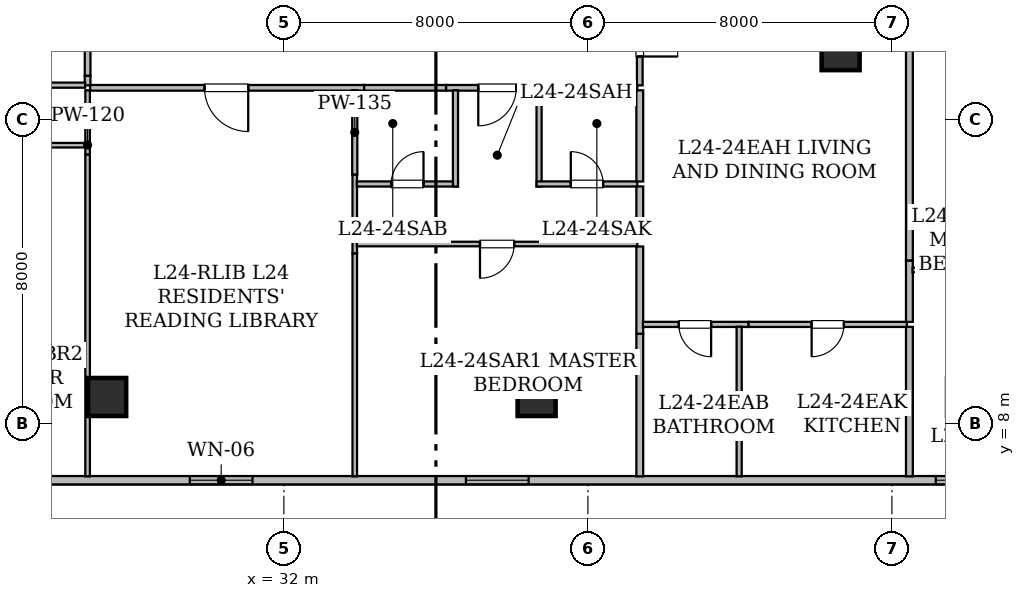
"""IFC4 building model, lengths in metres.
Left out: names, types, materials, properties, quantities, classifications, styles, units other than length and angle.
Written with IfcOpenShell. Run it as: python <this file> out.ifc"""

import sys

from ifc_helpers import new_model, si_unit, direction, frame, frame_2d, origin, origin_2d, place, context, subcontext, project, spatial, rectangle, hollow_rectangle, extrude, element, fill, save


model = new_model("IFC4")
c1 = context("Model", 3, precision=1e-05, world=origin(), true_north=direction((0.0, 1.0)))
c2 = subcontext(c1, "Body", "Model", "MODEL_VIEW")
j1 = project(units=[si_unit("LENGTHUNIT", "METRE"), si_unit("PLANEANGLEUNIT", "RADIAN")], contexts=[c1])
p1 = place(None, origin())
s1 = spatial("IfcSite", under=j1, at=p1, CompositionType="ELEMENT")
p2 = place(p1, origin())
s2 = spatial("IfcBuilding", under=s1, at=p2, CompositionType="ELEMENT")
p3 = place(p2, frame((0.0, 0.0, 98.25)))
s3 = spatial("IfcBuildingStorey", under=s2, at=p3, CompositionType="ELEMENT", Elevation=98.25)
for number, where, z_axis, x_axis in (
    (1, (27.35, 8.7, 0.0), (0.0, 0.0, 1.0), (1.0, 0.0, 0.0)),
    (2, (38.65, 8.7, 0.0), (0.0, 0.0, 1.0), (1.0, 0.0, 0.0)),
    (3, (46.65, 17.8, 0.0), (0.0, 0.0, 1.0), (1.0, 0.0, 0.0)),
):
    element("IfcColumn", number, at=place(p3, frame(where, z_axis=z_axis, x_axis=x_axis)), inside=s3, PredefinedType="COLUMN", context=c2, shape_type="SweptSolid", body=[
        extrude(hollow_rectangle(XDim=1.0, YDim=1.0, WallThickness=0.05, at=origin_2d()), origin(), (0.0, 0.0, 1.0), 3.65),
    ])
p4 = place(p3, frame((52.283, 6.51, 0.0), z_axis=(0.0, 0.0, 1.0), x_axis=(-1.0, 0.0, 0.0)))
e4 = element("IfcWall", 4, at=p4, inside=s3, PredefinedType="STANDARD", context=c2, shape_type="SweptSolid", body=[
    extrude(rectangle(XDim=38.568, YDim=0.22, at=frame_2d((19.284, 0.0))), origin(), (0.0, 0.0, 1.0), 3.43),
])
p5 = place(p4, frame((21.108, 0.0, 0.85)))
e5 = element("IfcOpeningElement", 5, at=p5, cuts=e4, PredefinedType="OPENING", context=c2, shape_type="SweptSolid", body=[
    extrude(rectangle(XDim=1.65, YDim=1.55, at=frame_2d((0.825, 0.775))), frame((0.0, 0.12, 0.0), z_axis=(0.0, -1.0, 0.0), x_axis=(1.0, 0.0, 0.0)), (0.0, 0.0, 1.0), 0.24),
])
p6 = place(p4, frame((35.355, 0.0, 0.85)))
e6 = element("IfcOpeningElement", 6, at=p6, cuts=e4, PredefinedType="OPENING", context=c2, shape_type="SweptSolid", body=[
    extrude(rectangle(XDim=1.65, YDim=1.55, at=frame_2d((0.825, 0.775))), frame((0.0, 0.12, 0.0), z_axis=(0.0, -1.0, 0.0), x_axis=(1.0, 0.0, 0.0)), (0.0, 0.0, 1.0), 0.24),
])
p7 = place(p4, frame((29.413, 0.0, 0.8)))
e7 = element("IfcOpeningElement", 7, at=p7, cuts=e4, PredefinedType="OPENING", context=c2, shape_type="SweptSolid", body=[
    extrude(rectangle(XDim=1.2, YDim=1.5, at=frame_2d((0.6, 0.75))), frame((0.0, 0.12, 0.0), z_axis=(0.0, -1.0, 0.0), x_axis=(1.0, 0.0, 0.0)), (0.0, 0.0, 1.0), 0.24),
])
p8 = place(p4, frame((31.863, 0.0, 0.85)))
e8 = element("IfcOpeningElement", 8, at=p8, cuts=e4, PredefinedType="OPENING", context=c2, shape_type="SweptSolid", body=[
    extrude(rectangle(XDim=1.65, YDim=1.55, at=frame_2d((0.825, 0.775))), frame((0.0, 0.12, 0.0), z_axis=(0.0, -1.0, 0.0), x_axis=(1.0, 0.0, 0.0)), (0.0, 0.0, 1.0), 0.24),
])
p9 = place(p4, frame((26.513, 0.0, 0.85)))
e9 = element("IfcOpeningElement", 9, at=p9, cuts=e4, PredefinedType="OPENING", context=c2, shape_type="SweptSolid", body=[
    extrude(rectangle(XDim=1.65, YDim=1.55, at=frame_2d((0.825, 0.775))), frame((0.0, 0.12, 0.0), z_axis=(0.0, -1.0, 0.0), x_axis=(1.0, 0.0, 0.0)), (0.0, 0.0, 1.0), 0.24),
])
p10 = place(p4, frame((13.843, 0.0, 0.85)))
e10 = element("IfcOpeningElement", 10, at=p10, cuts=e4, PredefinedType="OPENING", context=c2, shape_type="SweptSolid", body=[
    extrude(rectangle(XDim=1.65, YDim=1.55, at=frame_2d((0.825, 0.775))), frame((0.0, 0.12, 0.0), z_axis=(0.0, -1.0, 0.0), x_axis=(1.0, 0.0, 0.0)), (0.0, 0.0, 1.0), 0.24),
])
p11 = place(p4, frame((1.479, 0.0, 0.85)))
e11 = element("IfcOpeningElement", 11, at=p11, cuts=e4, PredefinedType="OPENING", context=c2, shape_type="SweptSolid", body=[
    extrude(rectangle(XDim=1.65, YDim=1.55, at=frame_2d((0.825, 0.775))), frame((0.0, 0.12, 0.0), z_axis=(0.0, -1.0, 0.0), x_axis=(1.0, 0.0, 0.0)), (0.0, 0.0, 1.0), 0.24),
])
p12 = place(p3, frame((34.114, 16.835, 0.0), z_axis=(0.0, 0.0, 1.0), x_axis=(-1.0, 0.0, 0.0)))
e12 = element("IfcWall", 12, at=p12, inside=s3, PredefinedType="STANDARD", context=c2, shape_type="SweptSolid", body=[
    extrude(rectangle(XDim=7.214, YDim=0.15, at=frame_2d((3.607, 0.0))), origin(), (0.0, 0.0, 1.0), 2.647),
])
p13 = place(p12, frame((3.053, 0.0, 0.0)))
e13 = element("IfcOpeningElement", 13, at=p13, cuts=e12, PredefinedType="OPENING", context=c2, shape_type="SweptSolid", body=[
    extrude(rectangle(XDim=1.15, YDim=2.2, at=frame_2d((0.575, 1.1))), frame((0.0, 0.085, 0.0), z_axis=(0.0, -1.0, 0.0), x_axis=(1.0, 0.0, 0.0)), (0.0, 0.0, 1.0), 0.17),
])
p14 = place(p3, frame((26.835, 16.9, 0.0), z_axis=(0.0, 0.0, 1.0), x_axis=(0.0, 1.0, 0.0)))
e14 = element("IfcWall", 14, at=p14, inside=s3, PredefinedType="STANDARD", context=c2, shape_type="SweptSolid", body=[
    extrude(rectangle(XDim=0.254, YDim=0.15, at=frame_2d((0.127, 0.0))), origin(), (0.0, 0.0, 1.0), 3.43),
])
p15 = place(p3, frame((26.835, 17.154, 0.0), z_axis=(0.0, 0.0, 1.0), x_axis=(0.0, 1.0, 0.0)))
e15 = element("IfcWall", 15, at=p15, inside=s3, PredefinedType="STANDARD", context=c2, shape_type="SweptSolid", body=[
    extrude(rectangle(XDim=3.396, YDim=0.15, at=frame_2d((1.698, 0.0))), origin(), (0.0, 0.0, 1.0), 2.647),
])
p16 = place(p3, frame((38.964, 16.835, 0.0), z_axis=(0.0, 0.0, 1.0), x_axis=(-1.0, 0.0, 0.0)))
e16 = element("IfcWall", 16, at=p16, inside=s3, PredefinedType="STANDARD", context=c2, shape_type="SweptSolid", body=[
    extrude(rectangle(XDim=2.698, YDim=0.15, at=frame_2d((1.349, 0.0))), origin(), (0.0, 0.0, 1.0), 3.43),
])
p17 = place(p16, frame((0.849, 0.0, 0.0)))
e17 = element("IfcOpeningElement", 17, at=p17, cuts=e16, PredefinedType="OPENING", context=c2, shape_type="SweptSolid", body=[
    extrude(rectangle(XDim=1.0, YDim=2.15, at=frame_2d((0.5, 1.075))), frame((0.0, 0.085, 0.0), z_axis=(0.0, -1.0, 0.0), x_axis=(1.0, 0.0, 0.0)), (0.0, 0.0, 1.0), 0.17),
])
p18 = place(p3, frame((36.266, 16.835, 0.0), z_axis=(0.0, 0.0, 1.0), x_axis=(-1.0, 0.0, 0.0)))
e18 = element("IfcWall", 18, at=p18, inside=s3, PredefinedType="STANDARD", context=c2, shape_type="SweptSolid", body=[
    extrude(rectangle(XDim=2.152, YDim=0.15, at=frame_2d((1.076, 0.0))), origin(), (0.0, 0.0, 1.0), 3.43),
])
p19 = place(p3, frame((41.3, 16.835, 0.0), z_axis=(0.0, 0.0, 1.0), x_axis=(-1.0, 0.0, 0.0)))
e19 = element("IfcWall", 19, at=p19, inside=s3, PredefinedType="STANDARD", context=c2, shape_type="SweptSolid", body=[
    extrude(rectangle(XDim=2.336, YDim=0.15, at=frame_2d((1.168, 0.0))), origin(), (0.0, 0.0, 1.0), 2.647),
])
p20 = place(p3, frame((41.365, 19.459, 0.0), z_axis=(0.0, 0.0, 1.0), x_axis=(0.0, -1.0, 0.0)))
e20 = element("IfcWall", 20, at=p20, inside=s3, PredefinedType="STANDARD", context=c2, shape_type="SweptSolid", body=[
    extrude(rectangle(XDim=2.559, YDim=0.15, at=frame_2d((1.28, 0.0))), origin(), (0.0, 0.0, 1.0), 2.647),
])
p21 = place(p20, frame((0.8, 0.0, 0.0)))
e21 = element("IfcOpeningElement", 21, at=p21, cuts=e20, PredefinedType="OPENING", context=c2, shape_type="SweptSolid", body=[
    extrude(rectangle(XDim=1.0, YDim=2.15, at=frame_2d((0.5, 1.075))), frame((0.0, 0.085, 0.0), z_axis=(0.0, -1.0, 0.0), x_axis=(1.0, 0.0, 0.0)), (0.0, 0.0, 1.0), 0.17),
])
p22 = place(p3, frame((26.835, 15.076, 0.0), z_axis=(0.0, 0.0, 1.0), x_axis=(0.0, 1.0, 0.0)))
e22 = element("IfcWall", 22, at=p22, inside=s3, PredefinedType="PARTITIONING", context=c2, shape_type="SweptSolid", body=[
    extrude(rectangle(XDim=1.694, YDim=0.12, at=frame_2d((0.847, 0.0))), origin(), (0.0, 0.0, 1.0), 3.43),
])
p23 = place(p3, frame((26.835, 6.612, 0.0), z_axis=(0.0, 0.0, 1.0), x_axis=(0.0, 1.0, 0.0)))
e23 = element("IfcWall", 23, at=p23, inside=s3, PredefinedType="PARTITIONING", context=c2, shape_type="SweptSolid", body=[
    extrude(rectangle(XDim=8.464, YDim=0.12, at=frame_2d((4.232, 0.0))), origin(), (0.0, 0.0, 1.0), 2.876),
])
p24 = place(p3, frame((33.865, 14.554, 0.0), z_axis=(0.0, 0.0, 1.0), x_axis=(0.0, -1.0, 0.0)))
e24 = element("IfcWall", 24, at=p24, inside=s3, PredefinedType="PARTITIONING", context=c2, shape_type="SweptSolid", body=[
    extrude(rectangle(XDim=2.078, YDim=0.12, at=frame_2d((1.039, 0.0))), origin(), (0.0, 0.0, 1.0), 3.43),
])
p25 = place(p3, frame((33.865, 16.77, 0.0), z_axis=(0.0, 0.0, 1.0), x_axis=(0.0, -1.0, 0.0)))
e25 = element("IfcWall", 25, at=p25, inside=s3, PredefinedType="PARTITIONING", context=c2, shape_type="SweptSolid", body=[
    extrude(rectangle(XDim=2.216, YDim=0.135, at=frame_2d((1.108, 0.0))), origin(), (0.0, 0.0, 1.0), 3.43),
])
p26 = place(p3, frame((33.865, 12.476, 0.0), z_axis=(0.0, 0.0, 1.0), x_axis=(0.0, -1.0, 0.0)))
e26 = element("IfcWall", 26, at=p26, inside=s3, PredefinedType="PARTITIONING", context=c2, shape_type="SweptSolid", body=[
    extrude(rectangle(XDim=5.864, YDim=0.12, at=frame_2d((2.932, 0.0))), origin(), (0.0, 0.0, 1.0), 2.876),
])
p27 = place(p3, frame((23.305, 16.905, 0.0), z_axis=(0.0, 0.0, 1.0), x_axis=(1.0, 0.0, 0.0)))
e27 = element("IfcWall", 27, at=p27, inside=s3, PredefinedType="PARTITIONING", context=c2, shape_type="SweptSolid", body=[
    extrude(rectangle(XDim=3.465, YDim=0.135, at=frame_2d((1.732, 0.0))), origin(), (0.0, 0.0, 1.0), 3.43),
])
p28 = place(p3, frame((26.781, 15.325, 0.0), z_axis=(0.0, 0.0, 1.0), x_axis=(-1.0, 0.0, 0.0)))
e28 = element("IfcWall", 28, at=p28, inside=s3, PredefinedType="PARTITIONING", context=c2, shape_type="SweptSolid", body=[
    extrude(rectangle(XDim=3.791, YDim=0.12, at=frame_2d((1.896, 0.0))), origin(), (0.0, 0.0, 1.0), 3.43),
])
p29 = place(p3, frame((33.919, 14.305, 0.0), z_axis=(0.0, 0.0, 1.0), x_axis=(1.0, 0.0, 0.0)))
e29 = element("IfcWall", 29, at=p29, inside=s3, PredefinedType="PARTITIONING", context=c2, shape_type="SweptSolid", body=[
    extrude(rectangle(XDim=2.661, YDim=0.135, at=frame_2d((1.331, 0.0))), origin(), (0.0, 0.0, 1.0), 3.43),
])
p30 = place(p29, frame((0.905, 0.0, 0.0)))
e30 = element("IfcOpeningElement", 30, at=p30, cuts=e29, PredefinedType="OPENING", context=c2, shape_type="SweptSolid", body=[
    extrude(rectangle(XDim=0.85, YDim=2.1, at=frame_2d((0.425, 1.05))), frame((0.0, 0.077, 0.0), z_axis=(0.0, -1.0, 0.0), x_axis=(1.0, 0.0, 0.0)), (0.0, 0.0, 1.0), 0.155),
])
p31 = place(p3, frame((36.515, 14.24, 0.0), z_axis=(0.0, 0.0, 1.0), x_axis=(0.0, 1.0, 0.0)))
e31 = element("IfcWall", 31, at=p31, inside=s3, PredefinedType="PARTITIONING", context=c2, shape_type="SweptSolid", body=[
    extrude(rectangle(XDim=2.53, YDim=0.135, at=frame_2d((1.265, 0.0))), origin(), (0.0, 0.0, 1.0), 3.43),
])
p32 = place(p3, frame((38.715, 16.77, 0.0), z_axis=(0.0, 0.0, 1.0), x_axis=(0.0, -1.0, 0.0)))
e32 = element("IfcWall", 32, at=p32, inside=s3, PredefinedType="PARTITIONING", context=c2, shape_type="SweptSolid", body=[
    extrude(rectangle(XDim=2.53, YDim=0.135, at=frame_2d((1.265, 0.0))), origin(), (0.0, 0.0, 1.0), 2.647),
])
p33 = place(p3, frame((38.65, 14.305, 0.0), z_axis=(0.0, 0.0, 1.0), x_axis=(1.0, 0.0, 0.0)))
e33 = element("IfcWall", 33, at=p33, inside=s3, PredefinedType="PARTITIONING", context=c2, shape_type="SweptSolid", body=[
    extrude(rectangle(XDim=2.65, YDim=0.135, at=frame_2d((1.325, 0.0))), origin(), (0.0, 0.0, 1.0), 2.647),
])
p34 = place(p33, frame((0.9, 0.0, 0.0)))
e34 = element("IfcOpeningElement", 34, at=p34, cuts=e33, PredefinedType="OPENING", context=c2, shape_type="SweptSolid", body=[
    extrude(rectangle(XDim=0.85, YDim=2.1, at=frame_2d((0.425, 1.05))), frame((0.0, 0.077, 0.0), z_axis=(0.0, -1.0, 0.0), x_axis=(1.0, 0.0, 0.0)), (0.0, 0.0, 1.0), 0.155),
])
p35 = place(p3, frame((41.3, 12.725, 0.0), z_axis=(0.0, 0.0, 1.0), x_axis=(-1.0, 0.0, 0.0)))
e35 = element("IfcWall", 35, at=p35, inside=s3, PredefinedType="PARTITIONING", context=c2, shape_type="SweptSolid", body=[
    extrude(rectangle(XDim=7.381, YDim=0.12, at=frame_2d((3.69, 0.0))), origin(), (0.0, 0.0, 1.0), 2.647),
])
p36 = place(p35, frame((3.24, 0.0, 0.0)))
e36 = element("IfcOpeningElement", 36, at=p36, cuts=e35, PredefinedType="OPENING", context=c2, shape_type="SweptSolid", body=[
    extrude(rectangle(XDim=0.9, YDim=2.1, at=frame_2d((0.45, 1.05))), frame((0.0, 0.07, 0.0), z_axis=(0.0, -1.0, 0.0), x_axis=(1.0, 0.0, 0.0)), (0.0, 0.0, 1.0), 0.14),
])
p37 = place(p3, frame((41.365, 14.24, 0.0), z_axis=(0.0, 0.0, 1.0), x_axis=(0.0, -1.0, 0.0)))
e37 = element("IfcWall", 37, at=p37, inside=s3, PredefinedType="STANDARD", context=c2, shape_type="SweptSolid", body=[
    extrude(rectangle(XDim=1.45, YDim=0.18, at=frame_2d((0.725, 0.0))), origin(), (0.0, 0.0, 1.0), 3.43),
])
p38 = place(p3, frame((41.365, 16.77, 0.0), z_axis=(0.0, 0.0, 1.0), x_axis=(0.0, -1.0, 0.0)))
e38 = element("IfcWall", 38, at=p38, inside=s3, PredefinedType="STANDARD", context=c2, shape_type="SweptSolid", body=[
    extrude(rectangle(XDim=2.4, YDim=0.18, at=frame_2d((1.2, 0.0))), origin(), (0.0, 0.0, 1.0), 3.43),
])
p39 = place(p3, frame((41.365, 12.66, 0.0), z_axis=(0.0, 0.0, 1.0), x_axis=(0.0, -1.0, 0.0)))
e39 = element("IfcWall", 39, at=p39, inside=s3, PredefinedType="STANDARD", context=c2, shape_type="SweptSolid", body=[
    extrude(rectangle(XDim=2.299, YDim=0.18, at=frame_2d((1.149, 0.0))), origin(), (0.0, 0.0, 1.0), 3.43),
])
p40 = place(p3, frame((41.365, 10.361, 0.0), z_axis=(0.0, 0.0, 1.0), x_axis=(0.0, -1.0, 0.0)))
e40 = element("IfcWall", 40, at=p40, inside=s3, PredefinedType="STANDARD", context=c2, shape_type="SweptSolid", body=[
    extrude(rectangle(XDim=3.749, YDim=0.18, at=frame_2d((1.875, 0.0))), origin(), (0.0, 0.0, 1.0), 2.876),
])
p41 = place(p3, frame((44.229, 10.61, 0.0), z_axis=(0.0, 0.0, 1.0), x_axis=(-1.0, 0.0, 0.0)))
e41 = element("IfcWall", 41, at=p41, inside=s3, PredefinedType="PARTITIONING", context=c2, shape_type="SweptSolid", body=[
    extrude(rectangle(XDim=2.782, YDim=0.135, at=frame_2d((1.391, 0.0))), origin(), (0.0, 0.0, 1.0), 3.43),
])
p42 = place(p41, frame((0.987, 0.0, 0.0)))
e42 = element("IfcOpeningElement", 42, at=p42, cuts=e41, PredefinedType="OPENING", context=c2, shape_type="SweptSolid", body=[
    extrude(rectangle(XDim=0.85, YDim=2.1, at=frame_2d((0.425, 1.05))), frame((0.0, 0.077, 0.0), z_axis=(0.0, -1.0, 0.0), x_axis=(1.0, 0.0, 0.0)), (0.0, 0.0, 1.0), 0.155),
])
p43 = place(p3, frame((48.395, 10.61, 0.0), z_axis=(0.0, 0.0, 1.0), x_axis=(-1.0, 0.0, 0.0)))
e43 = element("IfcWall", 43, at=p43, inside=s3, PredefinedType="PARTITIONING", context=c2, shape_type="SweptSolid", body=[
    extrude(rectangle(XDim=4.166, YDim=0.135, at=frame_2d((2.083, 0.0))), origin(), (0.0, 0.0, 1.0), 3.43),
])
p44 = place(p43, frame((1.658, 0.0, 0.0)))
e44 = element("IfcOpeningElement", 44, at=p44, cuts=e43, PredefinedType="OPENING", context=c2, shape_type="SweptSolid", body=[
    extrude(rectangle(XDim=0.85, YDim=2.1, at=frame_2d((0.425, 1.05))), frame((0.0, 0.077, 0.0), z_axis=(0.0, -1.0, 0.0), x_axis=(1.0, 0.0, 0.0)), (0.0, 0.0, 1.0), 0.155),
])
p45 = place(p3, frame((48.46, 12.292, 0.0), z_axis=(0.0, 0.0, 1.0), x_axis=(0.0, -1.0, 0.0)))
e45 = element("IfcWall", 45, at=p45, inside=s3, PredefinedType="STANDARD", context=c2, shape_type="SweptSolid", body=[
    extrude(rectangle(XDim=1.617, YDim=0.18, at=frame_2d((0.809, 0.0))), origin(), (0.0, 0.0, 1.0), 2.647),
])
p46 = place(p3, frame((48.46, 19.042, 0.0), z_axis=(0.0, 0.0, 1.0), x_axis=(0.0, -1.0, 0.0)))
e46 = element("IfcWall", 46, at=p46, inside=s3, PredefinedType="STANDARD", context=c2, shape_type="SweptSolid", body=[
    extrude(rectangle(XDim=6.75, YDim=0.18, at=frame_2d((3.375, 0.0))), origin(), (0.0, 0.0, 1.0), 2.647),
])
p47 = place(p3, frame((43.98, 10.548, 0.0), z_axis=(0.0, 0.0, 1.0), x_axis=(0.0, -1.0, 0.0)))
e47 = element("IfcWall", 47, at=p47, inside=s3, PredefinedType="PARTITIONING", context=c2, shape_type="SweptSolid", body=[
    extrude(rectangle(XDim=3.936, YDim=0.135, at=frame_2d((1.968, 0.0))), origin(), (0.0, 0.0, 1.0), 2.876),
])
p48 = place(p3, frame((48.46, 10.545, 0.0), z_axis=(0.0, 0.0, 1.0), x_axis=(0.0, -1.0, 0.0)))
e48 = element("IfcWall", 48, at=p48, inside=s3, PredefinedType="STANDARD", context=c2, shape_type="SweptSolid", body=[
    extrude(rectangle(XDim=3.933, YDim=0.18, at=frame_2d((1.966, 0.0))), origin(), (0.0, 0.0, 1.0), 2.876),
])
p49 = place(p3, frame((48.542, 12.043, 0.0), z_axis=(0.0, 0.0, 1.0), x_axis=(1.0, 0.0, 0.0)))
e49 = element("IfcWall", 49, at=p49, inside=s3, PredefinedType="PARTITIONING", context=c2, shape_type="SweptSolid", body=[
    extrude(rectangle(XDim=3.127, YDim=0.12, at=frame_2d((1.563, 0.0))), origin(), (0.0, 0.0, 1.0), 2.647),
])
p50 = place(p5, origin())
e50 = element("IfcWindow", 50, at=p50, inside=s3, PartitioningType="SINGLE_PANEL", PredefinedType="WINDOW", context=c2, shape_type="SweptSolid", body=[
    extrude(rectangle(XDim=1.65, YDim=1.55, at=frame_2d((0.825, 0.775))), frame((0.0, 0.03, 0.0), z_axis=(0.0, -1.0, 0.0), x_axis=(1.0, 0.0, 0.0)), (0.0, 0.0, 1.0), 0.06),
])
fill(e5, e50)
p51 = place(p10, origin())
e51 = element("IfcWindow", 51, at=p51, inside=s3, PartitioningType="SINGLE_PANEL", PredefinedType="WINDOW", context=c2, shape_type="SweptSolid", body=[
    extrude(rectangle(XDim=1.65, YDim=1.55, at=frame_2d((0.825, 0.775))), frame((0.0, 0.03, 0.0), z_axis=(0.0, -1.0, 0.0), x_axis=(1.0, 0.0, 0.0)), (0.0, 0.0, 1.0), 0.06),
])
fill(e10, e51)
p52 = place(p11, origin())
e52 = element("IfcWindow", 52, at=p52, inside=s3, PartitioningType="SINGLE_PANEL", PredefinedType="WINDOW", context=c2, shape_type="SweptSolid", body=[
    extrude(rectangle(XDim=1.65, YDim=1.55, at=frame_2d((0.825, 0.775))), frame((0.0, 0.03, 0.0), z_axis=(0.0, -1.0, 0.0), x_axis=(1.0, 0.0, 0.0)), (0.0, 0.0, 1.0), 0.06),
])
fill(e11, e52)
p53 = place(p13, origin())
e53 = element("IfcDoor", 53, at=p53, inside=s3, OperationType="SINGLE_SWING_LEFT", PredefinedType="DOOR", context=c2, shape_type="SweptSolid", body=[
    extrude(rectangle(XDim=1.15, YDim=2.2, at=frame_2d((0.575, 1.1))), frame((0.0, 0.025, 0.0), z_axis=(0.0, -1.0, 0.0), x_axis=(1.0, 0.0, 0.0)), (0.0, 0.0, 1.0), 0.05),
])
fill(e13, e53)
p54 = place(p17, origin())
e54 = element("IfcDoor", 54, at=p54, inside=s3, OperationType="SINGLE_SWING_RIGHT", PredefinedType="DOOR", context=c2, shape_type="SweptSolid", body=[
    extrude(rectangle(XDim=1.0, YDim=2.15, at=frame_2d((0.5, 1.075))), frame((0.0, 0.025, 0.0), z_axis=(0.0, -1.0, 0.0), x_axis=(1.0, 0.0, 0.0)), (0.0, 0.0, 1.0), 0.05),
])
fill(e17, e54)
p55 = place(p21, origin())
e55 = element("IfcDoor", 55, at=p55, inside=s3, OperationType="SINGLE_SWING_RIGHT", PredefinedType="DOOR", context=c2, shape_type="SweptSolid", body=[
    extrude(rectangle(XDim=1.0, YDim=2.15, at=frame_2d((0.5, 1.075))), frame((0.0, 0.025, 0.0), z_axis=(0.0, -1.0, 0.0), x_axis=(1.0, 0.0, 0.0)), (0.0, 0.0, 1.0), 0.05),
])
fill(e21, e55)
p56 = place(p30, origin())
e56 = element("IfcDoor", 56, at=p56, inside=s3, OperationType="SINGLE_SWING_RIGHT", PredefinedType="DOOR", context=c2, shape_type="SweptSolid", body=[
    extrude(rectangle(XDim=0.85, YDim=2.1, at=frame_2d((0.425, 1.05))), frame((0.0, 0.025, 0.0), z_axis=(0.0, -1.0, 0.0), x_axis=(1.0, 0.0, 0.0)), (0.0, 0.0, 1.0), 0.05),
])
fill(e30, e56)
p57 = place(p34, origin())
e57 = element("IfcDoor", 57, at=p57, inside=s3, OperationType="SINGLE_SWING_LEFT", PredefinedType="DOOR", context=c2, shape_type="SweptSolid", body=[
    extrude(rectangle(XDim=0.85, YDim=2.1, at=frame_2d((0.425, 1.05))), frame((0.0, 0.025, 0.0), z_axis=(0.0, -1.0, 0.0), x_axis=(1.0, 0.0, 0.0)), (0.0, 0.0, 1.0), 0.05),
])
fill(e34, e57)
p58 = place(p36, origin())
e58 = element("IfcDoor", 58, at=p58, inside=s3, OperationType="SINGLE_SWING_RIGHT", PredefinedType="DOOR", context=c2, shape_type="SweptSolid", body=[
    extrude(rectangle(XDim=0.9, YDim=2.1, at=frame_2d((0.45, 1.05))), frame((0.0, 0.025, 0.0), z_axis=(0.0, -1.0, 0.0), x_axis=(1.0, 0.0, 0.0)), (0.0, 0.0, 1.0), 0.05),
])
fill(e36, e58)
p59 = place(p42, origin())
e59 = element("IfcDoor", 59, at=p59, inside=s3, OperationType="SINGLE_SWING_LEFT", PredefinedType="DOOR", context=c2, shape_type="SweptSolid", body=[
    extrude(rectangle(XDim=0.85, YDim=2.1, at=frame_2d((0.425, 1.05))), frame((0.0, 0.025, 0.0), z_axis=(0.0, -1.0, 0.0), x_axis=(1.0, 0.0, 0.0)), (0.0, 0.0, 1.0), 0.05),
])
fill(e42, e59)
p60 = place(p44, origin())
e60 = element("IfcDoor", 60, at=p60, inside=s3, OperationType="SINGLE_SWING_RIGHT", PredefinedType="DOOR", context=c2, shape_type="SweptSolid", body=[
    extrude(rectangle(XDim=0.85, YDim=2.1, at=frame_2d((0.425, 1.05))), frame((0.0, 0.025, 0.0), z_axis=(0.0, -1.0, 0.0), x_axis=(1.0, 0.0, 0.0)), (0.0, 0.0, 1.0), 0.05),
])
fill(e44, e60)
save(model, sys.argv[1])
